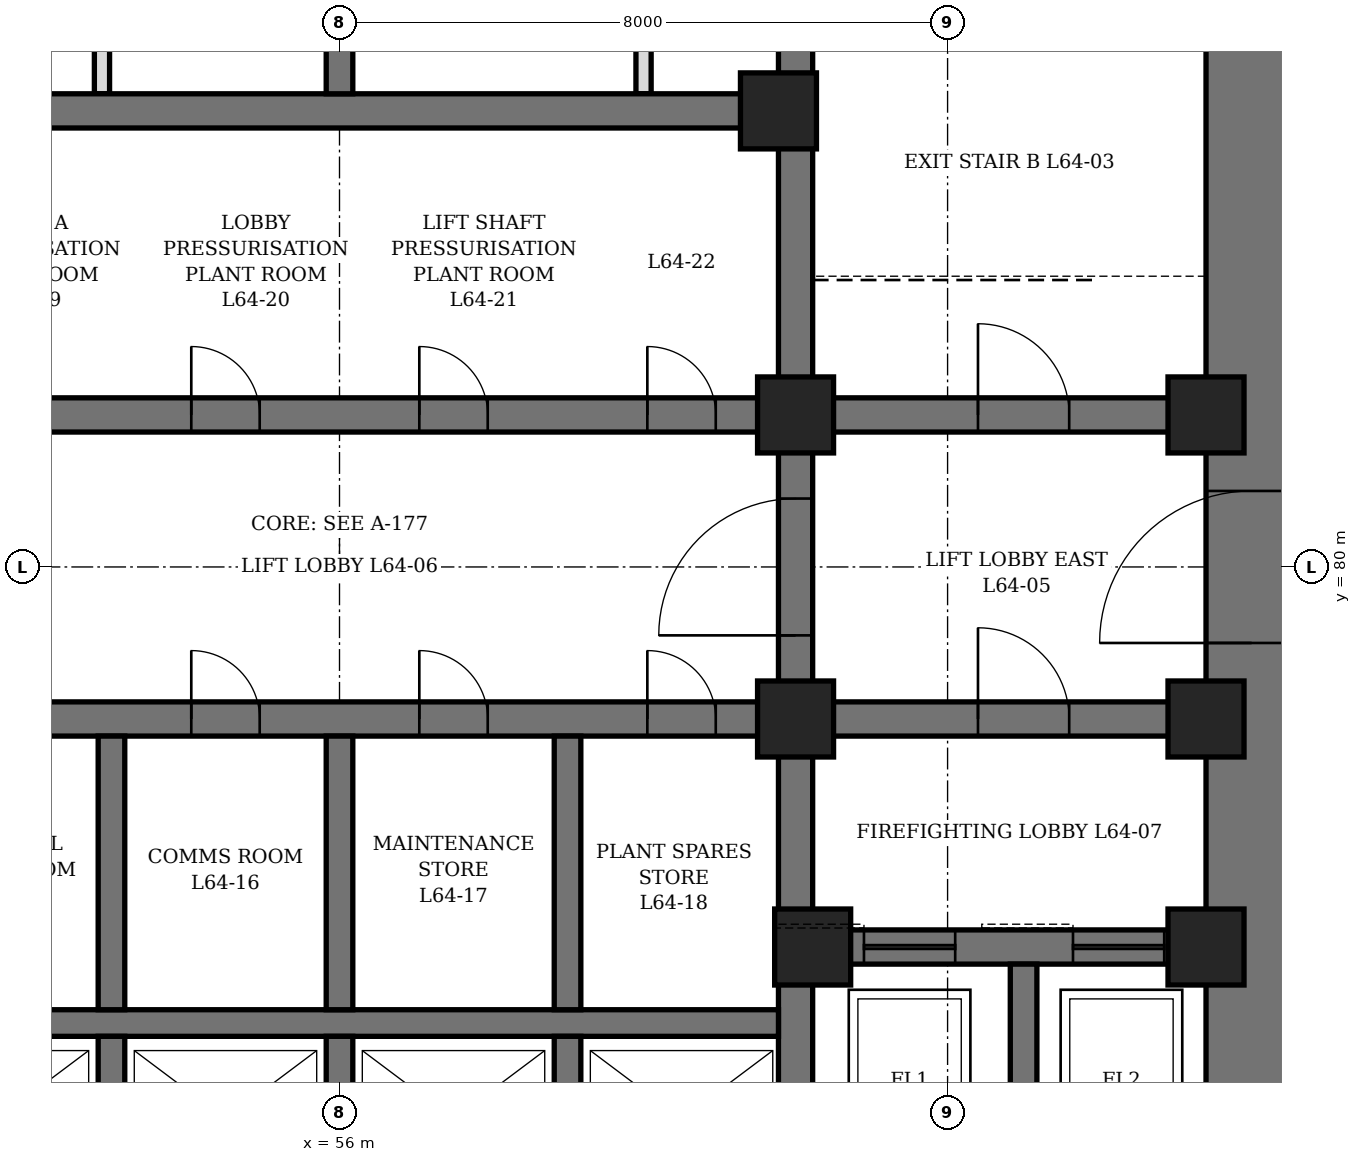
"""IFC4 building model, lengths in metres.
Left out: names, types, materials, properties, quantities, classifications, styles, units other than length and angle.
Written with IfcOpenShell. Run it as: python <this file> out.ifc"""

import sys

from ifc_helpers import new_model, si_unit, direction, frame, frame_2d, origin, origin_2d, place, context, subcontext, project, spatial, polyline, rectangle, hollow_rectangle, outline, extrude, element, fill, save


model = new_model("IFC4")
c1 = context("Model", 3, precision=1e-05, world=origin(), true_north=direction((0.0, 1.0)))
c2 = subcontext(c1, "Body", "Model", "MODEL_VIEW")
j1 = project(units=[si_unit("LENGTHUNIT", "METRE"), si_unit("PLANEANGLEUNIT", "RADIAN")], contexts=[c1])
p1 = place(None, origin())
s1 = spatial("IfcSite", under=j1, at=p1, CompositionType="ELEMENT")
p2 = place(p1, origin())
s2 = spatial("IfcBuilding", under=s1, at=p2, CompositionType="ELEMENT")
p3 = place(p2, frame((0.0, 0.0, 285.7)))
s3 = spatial("IfcBuildingStorey", under=s2, at=p3, CompositionType="ELEMENT", Elevation=285.7)
p4 = place(p3, frame((68.0, 70.4, 0.0), z_axis=(0.0, 0.0, 1.0), x_axis=(0.0, 1.0, 0.0)))
e1 = element("IfcWall", 1, at=p4, inside=s3, PredefinedType="SHEAR", context=c2, shape_type="SweptSolid", body=[
    extrude(outline(polyline([(0.0, 0.0), (19.2, 0.0), (19.2, 16.743), (0.0, 9.537), (0.0, 0.0)])), frame((0.0, 0.6, 0.0), z_axis=(0.0, -1.0, 0.0), x_axis=(1.0, 0.0, 0.0)), (0.0, 0.0, 1.0), 1.2),
])
p5 = place(p4, frame((8.6, 0.0, 0.0)))
e2 = element("IfcOpeningElement", 2, at=p5, cuts=e1, PredefinedType="OPENING", context=c2, shape_type="SweptSolid", body=[
    extrude(rectangle(XDim=2.0, YDim=2.4, at=frame_2d((1.0, 1.2))), frame((0.0, 0.61, 0.0), z_axis=(0.0, -1.0, 0.0), x_axis=(1.0, 0.0, 0.0)), (0.0, 0.0, 1.0), 1.22),
])
p6 = place(p3, frame((62.0, 71.6, 0.0), z_axis=(0.0, 0.0, 1.0), x_axis=(0.0, 1.0, 0.0)))
e3 = element("IfcWall", 3, at=p6, inside=s3, PredefinedType="SHEAR", context=c2, shape_type="SweptSolid", body=[
    extrude(outline(polyline([(0.0, 0.0), (16.8, 0.0), (16.8, 16.293), (0.0, 9.987), (0.0, 0.0)])), frame((0.0, 0.225, 0.0), z_axis=(0.0, -1.0, 0.0), x_axis=(1.0, 0.0, 0.0)), (0.0, 0.0, 1.0), 0.45),
])
p7 = place(p6, frame((7.5, 0.0, 0.0)))
e4 = element("IfcOpeningElement", 4, at=p7, cuts=e3, PredefinedType="OPENING", context=c2, shape_type="SweptSolid", body=[
    extrude(rectangle(XDim=1.8, YDim=2.4, at=frame_2d((0.9, 1.2))), frame((0.0, 0.235, 0.0), z_axis=(0.0, -1.0, 0.0), x_axis=(1.0, 0.0, 0.0)), (0.0, 0.0, 1.0), 0.47),
])
p8 = place(p3, frame((62.225, 75.0, 0.0), z_axis=(0.0, 0.0, 1.0), x_axis=(1.0, 0.0, 0.0)))
e5 = element("IfcWall", 5, at=p8, inside=s3, PredefinedType="SHEAR", context=c2, shape_type="SweptSolid", body=[
    extrude(outline(polyline([(0.0, 0.0), (5.175, 0.0), (5.175, 11.179), (0.0, 11.179), (0.0, 0.0)])), frame((0.0, 0.225, 0.0), z_axis=(0.0, -1.0, 0.0), x_axis=(1.0, 0.0, 0.0)), (0.0, 0.0, 1.0), 0.45),
])
p9 = place(p8, frame((0.675, 0.0, 0.0)))
e6 = element("IfcOpeningElement", 6, at=p9, cuts=e5, PredefinedType="OPENING", context=c2, shape_type="SweptSolid", body=[
    extrude(rectangle(XDim=1.2, YDim=2.2, at=frame_2d((0.6, 1.1))), frame((0.0, 0.235, 0.0), z_axis=(0.0, -1.0, 0.0), x_axis=(1.0, 0.0, 0.0)), (0.0, 0.0, 1.0), 0.47),
])
p10 = place(p8, frame((3.425, 0.0, 0.0)))
e7 = element("IfcOpeningElement", 7, at=p10, cuts=e5, PredefinedType="OPENING", context=c2, shape_type="SweptSolid", body=[
    extrude(rectangle(XDim=1.2, YDim=2.2, at=frame_2d((0.6, 1.1))), frame((0.0, 0.235, 0.0), z_axis=(0.0, -1.0, 0.0), x_axis=(1.0, 0.0, 0.0)), (0.0, 0.0, 1.0), 0.47),
])
p11 = place(p3, frame((62.225, 78.0, 0.0), z_axis=(0.0, 0.0, 1.0), x_axis=(1.0, 0.0, 0.0)))
e8 = element("IfcWall", 8, at=p11, inside=s3, PredefinedType="SHEAR", context=c2, shape_type="SweptSolid", body=[
    extrude(outline(polyline([(0.0, 0.0), (5.175, 0.0), (5.175, 12.305), (0.0, 12.305), (0.0, 0.0)])), frame((0.0, 0.225, 0.0), z_axis=(0.0, -1.0, 0.0), x_axis=(1.0, 0.0, 0.0)), (0.0, 0.0, 1.0), 0.45),
])
p12 = place(p11, frame((2.175, 0.0, 0.0)))
e9 = element("IfcOpeningElement", 9, at=p12, cuts=e8, PredefinedType="OPENING", context=c2, shape_type="SweptSolid", body=[
    extrude(rectangle(XDim=1.2, YDim=2.1, at=frame_2d((0.6, 1.05))), frame((0.0, 0.235, 0.0), z_axis=(0.0, -1.0, 0.0), x_axis=(1.0, 0.0, 0.0)), (0.0, 0.0, 1.0), 0.47),
])
p13 = place(p3, frame((62.225, 82.0, 0.0), z_axis=(0.0, 0.0, 1.0), x_axis=(1.0, 0.0, 0.0)))
e10 = element("IfcWall", 10, at=p13, inside=s3, PredefinedType="SHEAR", context=c2, shape_type="SweptSolid", body=[
    extrude(outline(polyline([(0.0, 0.0), (5.175, 0.0), (5.175, 13.806), (0.0, 13.806), (0.0, 0.0)])), frame((0.0, 0.225, 0.0), z_axis=(0.0, -1.0, 0.0), x_axis=(1.0, 0.0, 0.0)), (0.0, 0.0, 1.0), 0.45),
])
p14 = place(p13, frame((2.175, 0.0, 0.0)))
e11 = element("IfcOpeningElement", 11, at=p14, cuts=e10, PredefinedType="OPENING", context=c2, shape_type="SweptSolid", body=[
    extrude(rectangle(XDim=1.2, YDim=2.1, at=frame_2d((0.6, 1.05))), frame((0.0, 0.235, 0.0), z_axis=(0.0, -1.0, 0.0), x_axis=(1.0, 0.0, 0.0)), (0.0, 0.0, 1.0), 0.47),
])
p15 = place(p3, frame((50.225, 78.0, 0.0), z_axis=(0.0, 0.0, 1.0), x_axis=(1.0, 0.0, 0.0)))
e12 = element("IfcWall", 12, at=p15, inside=s3, PredefinedType="SHEAR", context=c2, shape_type="SweptSolid", body=[
    extrude(outline(polyline([(0.0, 0.0), (11.55, 0.0), (11.55, 12.305), (0.0, 12.305), (0.0, 0.0)])), frame((0.0, 0.225, 0.0), z_axis=(0.0, -1.0, 0.0), x_axis=(1.0, 0.0, 0.0)), (0.0, 0.0, 1.0), 0.45),
])
p16 = place(p15, frame((0.825, 0.0, 0.0)))
e13 = element("IfcOpeningElement", 13, at=p16, cuts=e12, PredefinedType="OPENING", context=c2, shape_type="SweptSolid", body=[
    extrude(rectangle(XDim=0.9, YDim=2.1, at=frame_2d((0.45, 1.05))), frame((0.0, 0.235, 0.0), z_axis=(0.0, -1.0, 0.0), x_axis=(1.0, 0.0, 0.0)), (0.0, 0.0, 1.0), 0.47),
])
p17 = place(p15, frame((3.825, 0.0, 0.0)))
e14 = element("IfcOpeningElement", 14, at=p17, cuts=e12, PredefinedType="OPENING", context=c2, shape_type="SweptSolid", body=[
    extrude(rectangle(XDim=0.9, YDim=2.1, at=frame_2d((0.45, 1.05))), frame((0.0, 0.235, 0.0), z_axis=(0.0, -1.0, 0.0), x_axis=(1.0, 0.0, 0.0)), (0.0, 0.0, 1.0), 0.47),
])
p18 = place(p15, frame((6.825, 0.0, 0.0)))
e15 = element("IfcOpeningElement", 15, at=p18, cuts=e12, PredefinedType="OPENING", context=c2, shape_type="SweptSolid", body=[
    extrude(rectangle(XDim=0.9, YDim=2.1, at=frame_2d((0.45, 1.05))), frame((0.0, 0.235, 0.0), z_axis=(0.0, -1.0, 0.0), x_axis=(1.0, 0.0, 0.0)), (0.0, 0.0, 1.0), 0.47),
])
p19 = place(p15, frame((9.825, 0.0, 0.0)))
e16 = element("IfcOpeningElement", 16, at=p19, cuts=e12, PredefinedType="OPENING", context=c2, shape_type="SweptSolid", body=[
    extrude(rectangle(XDim=0.9, YDim=2.1, at=frame_2d((0.45, 1.05))), frame((0.0, 0.235, 0.0), z_axis=(0.0, -1.0, 0.0), x_axis=(1.0, 0.0, 0.0)), (0.0, 0.0, 1.0), 0.47),
])
p20 = place(p3, frame((50.225, 82.0, 0.0), z_axis=(0.0, 0.0, 1.0), x_axis=(1.0, 0.0, 0.0)))
e17 = element("IfcWall", 17, at=p20, inside=s3, PredefinedType="SHEAR", context=c2, shape_type="SweptSolid", body=[
    extrude(outline(polyline([(0.0, 0.0), (11.55, 0.0), (11.55, 13.806), (0.0, 13.806), (0.0, 0.0)])), frame((0.0, 0.225, 0.0), z_axis=(0.0, -1.0, 0.0), x_axis=(1.0, 0.0, 0.0)), (0.0, 0.0, 1.0), 0.45),
])
p21 = place(p20, frame((0.825, 0.0, 0.0)))
e18 = element("IfcOpeningElement", 18, at=p21, cuts=e17, PredefinedType="OPENING", context=c2, shape_type="SweptSolid", body=[
    extrude(rectangle(XDim=0.9, YDim=2.1, at=frame_2d((0.45, 1.05))), frame((0.0, 0.235, 0.0), z_axis=(0.0, -1.0, 0.0), x_axis=(1.0, 0.0, 0.0)), (0.0, 0.0, 1.0), 0.47),
])
p22 = place(p20, frame((3.825, 0.0, 0.0)))
e19 = element("IfcOpeningElement", 19, at=p22, cuts=e17, PredefinedType="OPENING", context=c2, shape_type="SweptSolid", body=[
    extrude(rectangle(XDim=0.9, YDim=2.1, at=frame_2d((0.45, 1.05))), frame((0.0, 0.235, 0.0), z_axis=(0.0, -1.0, 0.0), x_axis=(1.0, 0.0, 0.0)), (0.0, 0.0, 1.0), 0.47),
])
p23 = place(p20, frame((6.825, 0.0, 0.0)))
e20 = element("IfcOpeningElement", 20, at=p23, cuts=e17, PredefinedType="OPENING", context=c2, shape_type="SweptSolid", body=[
    extrude(rectangle(XDim=0.9, YDim=2.1, at=frame_2d((0.45, 1.05))), frame((0.0, 0.235, 0.0), z_axis=(0.0, -1.0, 0.0), x_axis=(1.0, 0.0, 0.0)), (0.0, 0.0, 1.0), 0.47),
])
p24 = place(p20, frame((9.825, 0.0, 0.0)))
e21 = element("IfcOpeningElement", 21, at=p24, cuts=e17, PredefinedType="OPENING", context=c2, shape_type="SweptSolid", body=[
    extrude(rectangle(XDim=0.9, YDim=2.1, at=frame_2d((0.45, 1.05))), frame((0.0, 0.235, 0.0), z_axis=(0.0, -1.0, 0.0), x_axis=(1.0, 0.0, 0.0)), (0.0, 0.0, 1.0), 0.47),
])
p25 = place(p3, frame((50.225, 86.0, 0.0), z_axis=(0.0, 0.0, 1.0), x_axis=(1.0, 0.0, 0.0)))
e22 = element("IfcWall", 22, at=p25, inside=s3, PredefinedType="SHEAR", context=c2, shape_type="SweptSolid", body=[
    extrude(outline(polyline([(0.0, 0.0), (11.55, 0.0), (11.55, 15.307), (0.0, 15.307), (0.0, 0.0)])), frame((0.0, 0.225, 0.0), z_axis=(0.0, -1.0, 0.0), x_axis=(1.0, 0.0, 0.0)), (0.0, 0.0, 1.0), 0.45),
])
p26 = place(p3, frame((50.225, 74.0, 0.0), z_axis=(0.0, 0.0, 1.0), x_axis=(1.0, 0.0, 0.0)))
e23 = element("IfcWall", 23, at=p26, inside=s3, PredefinedType="SHEAR", context=c2, shape_type="SweptSolid", body=[
    extrude(outline(polyline([(0.0, 0.0), (11.55, 0.0), (11.55, 10.822), (0.0, 10.822), (0.0, 0.0)])), frame((0.0, 0.175, 0.0), z_axis=(0.0, -1.0, 0.0), x_axis=(1.0, 0.0, 0.0)), (0.0, 0.0, 1.0), 0.35),
])
p27 = place(p3, frame((53.0, 71.6, 0.0), z_axis=(0.0, 0.0, 1.0), x_axis=(0.0, 1.0, 0.0)))
e24 = element("IfcWall", 24, at=p27, inside=s3, PredefinedType="SHEAR", context=c2, shape_type="SweptSolid", body=[
    extrude(outline(polyline([(0.0, 0.0), (2.225, 0.0), (2.225, 10.822), (0.0, 9.987), (0.0, 0.0)])), frame((0.0, 0.175, 0.0), z_axis=(0.0, -1.0, 0.0), x_axis=(1.0, 0.0, 0.0)), (0.0, 0.0, 1.0), 0.35),
])
p28 = place(p3, frame((53.0, 74.175, 0.0), z_axis=(0.0, 0.0, 1.0), x_axis=(0.0, 1.0, 0.0)))
e25 = element("IfcWall", 25, at=p28, inside=s3, PredefinedType="SHEAR", context=c2, shape_type="SweptSolid", body=[
    extrude(outline(polyline([(0.0, 0.0), (3.6, 0.0), (3.6, 12.305), (0.0, 10.954), (0.0, 0.0)])), frame((0.0, 0.175, 0.0), z_axis=(0.0, -1.0, 0.0), x_axis=(1.0, 0.0, 0.0)), (0.0, 0.0, 1.0), 0.35),
])
p29 = place(p3, frame((56.0, 71.6, 0.0), z_axis=(0.0, 0.0, 1.0), x_axis=(0.0, 1.0, 0.0)))
e26 = element("IfcWall", 26, at=p29, inside=s3, PredefinedType="SHEAR", context=c2, shape_type="SweptSolid", body=[
    extrude(outline(polyline([(0.0, 0.0), (2.225, 0.0), (2.225, 10.822), (0.0, 9.987), (0.0, 0.0)])), frame((0.0, 0.175, 0.0), z_axis=(0.0, -1.0, 0.0), x_axis=(1.0, 0.0, 0.0)), (0.0, 0.0, 1.0), 0.35),
])
p30 = place(p3, frame((56.0, 74.175, 0.0), z_axis=(0.0, 0.0, 1.0), x_axis=(0.0, 1.0, 0.0)))
e27 = element("IfcWall", 27, at=p30, inside=s3, PredefinedType="SHEAR", context=c2, shape_type="SweptSolid", body=[
    extrude(outline(polyline([(0.0, 0.0), (3.6, 0.0), (3.6, 12.305), (0.0, 10.954), (0.0, 0.0)])), frame((0.0, 0.175, 0.0), z_axis=(0.0, -1.0, 0.0), x_axis=(1.0, 0.0, 0.0)), (0.0, 0.0, 1.0), 0.35),
])
p31 = place(p3, frame((59.0, 71.6, 0.0), z_axis=(0.0, 0.0, 1.0), x_axis=(0.0, 1.0, 0.0)))
e28 = element("IfcWall", 28, at=p31, inside=s3, PredefinedType="SHEAR", context=c2, shape_type="SweptSolid", body=[
    extrude(outline(polyline([(0.0, 0.0), (2.225, 0.0), (2.225, 10.822), (0.0, 9.987), (0.0, 0.0)])), frame((0.0, 0.175, 0.0), z_axis=(0.0, -1.0, 0.0), x_axis=(1.0, 0.0, 0.0)), (0.0, 0.0, 1.0), 0.35),
])
p32 = place(p3, frame((59.0, 74.175, 0.0), z_axis=(0.0, 0.0, 1.0), x_axis=(0.0, 1.0, 0.0)))
e29 = element("IfcWall", 29, at=p32, inside=s3, PredefinedType="SHEAR", context=c2, shape_type="SweptSolid", body=[
    extrude(outline(polyline([(0.0, 0.0), (3.6, 0.0), (3.6, 12.305), (0.0, 10.954), (0.0, 0.0)])), frame((0.0, 0.175, 0.0), z_axis=(0.0, -1.0, 0.0), x_axis=(1.0, 0.0, 0.0)), (0.0, 0.0, 1.0), 0.35),
])
p33 = place(p3, frame((65.0, 71.6, 0.0), z_axis=(0.0, 0.0, 1.0), x_axis=(0.0, 1.0, 0.0)))
e30 = element("IfcWall", 30, at=p33, inside=s3, PredefinedType="SHEAR", context=c2, shape_type="SweptSolid", body=[
    extrude(outline(polyline([(0.0, 0.0), (3.175, 0.0), (3.175, 11.179), (0.0, 9.987), (0.0, 0.0)])), frame((0.0, 0.175, 0.0), z_axis=(0.0, -1.0, 0.0), x_axis=(1.0, 0.0, 0.0)), (0.0, 0.0, 1.0), 0.35),
])
p34 = place(p3, frame((56.0, 86.225, 0.0), z_axis=(0.0, 0.0, 1.0), x_axis=(0.0, 1.0, 0.0)))
e31 = element("IfcWall", 31, at=p34, inside=s3, PredefinedType="SHEAR", context=c2, shape_type="SweptSolid", body=[
    extrude(outline(polyline([(0.0, 0.0), (2.175, 0.0), (2.175, 16.293), (0.0, 15.476), (0.0, 0.0)])), frame((0.0, 0.175, 0.0), z_axis=(0.0, -1.0, 0.0), x_axis=(1.0, 0.0, 0.0)), (0.0, 0.0, 1.0), 0.35),
])
p35 = place(p3, frame((61.775, 86.0, 0.0), z_axis=(0.0, 0.0, 1.0), x_axis=(1.0, 0.0, 0.0)))
e32 = element("IfcColumn", 32, at=p35, inside=s3, PredefinedType="COLUMN", context=c2, shape_type="SweptSolid", body=[
    extrude(hollow_rectangle(XDim=1.0, YDim=1.0, WallThickness=0.15, at=origin_2d()), origin(), (0.0, 0.0, 1.0), 15.204),
])
p36 = place(p3, frame((62.0, 78.0, 0.0), z_axis=(0.0, 0.0, 1.0), x_axis=(1.0, 0.0, 0.0)))
e33 = element("IfcColumn", 33, at=p36, inside=s3, PredefinedType="COLUMN", context=c2, shape_type="SweptSolid", body=[
    extrude(hollow_rectangle(XDim=1.0, YDim=1.0, WallThickness=0.15, at=origin_2d()), origin(), (0.0, 0.0, 1.0), 12.201),
])
p37 = place(p3, frame((62.0, 82.0, 0.0), z_axis=(0.0, 0.0, 1.0), x_axis=(1.0, 0.0, 0.0)))
e34 = element("IfcColumn", 34, at=p37, inside=s3, PredefinedType="COLUMN", context=c2, shape_type="SweptSolid", body=[
    extrude(hollow_rectangle(XDim=1.0, YDim=1.0, WallThickness=0.15, at=origin_2d()), origin(), (0.0, 0.0, 1.0), 13.703),
])
for number, where, z_axis, x_axis in (
    (35, (62.225, 75.0, 0.0), (0.0, 0.0, 1.0), (1.0, 0.0, 0.0)),
    (36, (67.4, 75.0, 0.0), (0.0, 0.0, 1.0), (1.0, 0.0, 0.0)),
):
    element("IfcColumn", number, at=place(p3, frame(where, z_axis=z_axis, x_axis=x_axis)), inside=s3, PredefinedType="COLUMN", context=c2, shape_type="SweptSolid", body=[
        extrude(hollow_rectangle(XDim=1.0, YDim=1.0, WallThickness=0.15, at=origin_2d()), origin(), (0.0, 0.0, 1.0), 11.075),
    ])
p38 = place(p3, frame((67.4, 78.0, 0.0), z_axis=(0.0, 0.0, 1.0), x_axis=(1.0, 0.0, 0.0)))
e37 = element("IfcColumn", 37, at=p38, inside=s3, PredefinedType="COLUMN", context=c2, shape_type="SweptSolid", body=[
    extrude(hollow_rectangle(XDim=1.0, YDim=1.0, WallThickness=0.15, at=origin_2d()), origin(), (0.0, 0.0, 1.0), 12.201),
])
p39 = place(p3, frame((67.4, 82.0, 0.0), z_axis=(0.0, 0.0, 1.0), x_axis=(1.0, 0.0, 0.0)))
e38 = element("IfcColumn", 38, at=p39, inside=s3, PredefinedType="COLUMN", context=c2, shape_type="SweptSolid", body=[
    extrude(hollow_rectangle(XDim=1.0, YDim=1.0, WallThickness=0.15, at=origin_2d()), origin(), (0.0, 0.0, 1.0), 13.703),
])
p40 = place(p3, frame((52.875, 86.225, 0.0), z_axis=(0.0, 0.0, 1.0), x_axis=(0.0, 1.0, 0.0)))
e39 = element("IfcWall", 39, at=p40, inside=s3, PredefinedType="PARTITIONING", context=c2, shape_type="SweptSolid", body=[
    extrude(rectangle(XDim=2.175, YDim=0.2, at=frame_2d((1.087, 0.0))), origin(), (0.0, 0.0, 1.0), 8.0),
])
p41 = place(p3, frame((60.0, 86.225, 0.0), z_axis=(0.0, 0.0, 1.0), x_axis=(0.0, 1.0, 0.0)))
e40 = element("IfcWall", 40, at=p41, inside=s3, PredefinedType="PARTITIONING", context=c2, shape_type="SweptSolid", body=[
    extrude(rectangle(XDim=2.175, YDim=0.2, at=frame_2d((1.087, 0.0))), origin(), (0.0, 0.0, 1.0), 8.0),
])
p42 = place(p41, frame((0.637, 0.0, 0.0)))
e41 = element("IfcOpeningElement", 41, at=p42, cuts=e40, PredefinedType="OPENING", context=c2, shape_type="SweptSolid", body=[
    extrude(rectangle(XDim=0.9, YDim=2.1, at=frame_2d((0.45, 1.05))), frame((0.0, 0.11, 0.0), z_axis=(0.0, -1.0, 0.0), x_axis=(1.0, 0.0, 0.0)), (0.0, 0.0, 1.0), 0.22),
])
p43 = place(p17, origin())
e42 = element("IfcDoor", 42, at=p43, inside=s3, OperationType="SINGLE_SWING_LEFT", PredefinedType="DOOR", context=c2, shape_type="SweptSolid", body=[
    extrude(rectangle(XDim=0.9, YDim=2.1, at=frame_2d((0.45, 1.05))), frame((0.0, 0.225, 0.0), z_axis=(0.0, -1.0, 0.0), x_axis=(1.0, 0.0, 0.0)), (0.0, 0.0, 1.0), 0.449),
])
fill(e14, e42)
p44 = place(p18, origin())
e43 = element("IfcDoor", 43, at=p44, inside=s3, OperationType="SINGLE_SWING_LEFT", PredefinedType="DOOR", context=c2, shape_type="SweptSolid", body=[
    extrude(rectangle(XDim=0.9, YDim=2.1, at=frame_2d((0.45, 1.05))), frame((0.0, 0.225, 0.0), z_axis=(0.0, -1.0, 0.0), x_axis=(1.0, 0.0, 0.0)), (0.0, 0.0, 1.0), 0.449),
])
fill(e15, e43)
p45 = place(p19, origin())
e44 = element("IfcDoor", 44, at=p45, inside=s3, OperationType="SINGLE_SWING_LEFT", PredefinedType="DOOR", context=c2, shape_type="SweptSolid", body=[
    extrude(rectangle(XDim=0.9, YDim=2.1, at=frame_2d((0.45, 1.05))), frame((0.0, 0.225, 0.0), z_axis=(0.0, -1.0, 0.0), x_axis=(1.0, 0.0, 0.0)), (0.0, 0.0, 1.0), 0.449),
])
fill(e16, e44)
p46 = place(p22, origin())
e45 = element("IfcDoor", 45, at=p46, inside=s3, OperationType="SINGLE_SWING_LEFT", PredefinedType="DOOR", context=c2, shape_type="SweptSolid", body=[
    extrude(rectangle(XDim=0.9, YDim=2.1, at=frame_2d((0.45, 1.05))), frame((0.0, 0.225, 0.0), z_axis=(0.0, -1.0, 0.0), x_axis=(1.0, 0.0, 0.0)), (0.0, 0.0, 1.0), 0.449),
])
fill(e19, e45)
p47 = place(p23, origin())
e46 = element("IfcDoor", 46, at=p47, inside=s3, OperationType="SINGLE_SWING_LEFT", PredefinedType="DOOR", context=c2, shape_type="SweptSolid", body=[
    extrude(rectangle(XDim=0.9, YDim=2.1, at=frame_2d((0.45, 1.05))), frame((0.0, 0.225, 0.0), z_axis=(0.0, -1.0, 0.0), x_axis=(1.0, 0.0, 0.0)), (0.0, 0.0, 1.0), 0.449),
])
fill(e20, e46)
p48 = place(p24, origin())
e47 = element("IfcDoor", 47, at=p48, inside=s3, OperationType="SINGLE_SWING_LEFT", PredefinedType="DOOR", context=c2, shape_type="SweptSolid", body=[
    extrude(rectangle(XDim=0.9, YDim=2.1, at=frame_2d((0.45, 1.05))), frame((0.0, 0.225, 0.0), z_axis=(0.0, -1.0, 0.0), x_axis=(1.0, 0.0, 0.0)), (0.0, 0.0, 1.0), 0.449),
])
fill(e21, e47)
p49 = place(p14, origin())
e48 = element("IfcDoor", 48, at=p49, inside=s3, OperationType="SINGLE_SWING_LEFT", PredefinedType="DOOR", context=c2, shape_type="SweptSolid", body=[
    extrude(rectangle(XDim=1.2, YDim=2.1, at=frame_2d((0.6, 1.05))), frame((0.0, 0.225, 0.0), z_axis=(0.0, -1.0, 0.0), x_axis=(1.0, 0.0, 0.0)), (0.0, 0.0, 1.0), 0.449),
])
fill(e11, e48)
p50 = place(p5, origin())
e49 = element("IfcDoor", 49, at=p50, inside=s3, OperationType="DOUBLE_DOOR_SINGLE_SWING", PredefinedType="DOOR", context=c2, shape_type="SweptSolid", body=[
    extrude(rectangle(XDim=2.0, YDim=2.4, at=frame_2d((1.0, 1.2))), frame((0.0, 0.35, 0.0), z_axis=(0.0, -1.0, 0.0), x_axis=(1.0, 0.0, 0.0)), (0.0, 0.0, 1.0), 0.7),
])
fill(e2, e49)
p51 = place(p7, origin())
e50 = element("IfcDoor", 50, at=p51, inside=s3, OperationType="DOUBLE_DOOR_SINGLE_SWING", PredefinedType="DOOR", context=c2, shape_type="SweptSolid", body=[
    extrude(rectangle(XDim=1.8, YDim=2.4, at=frame_2d((0.9, 1.2))), frame((0.0, 0.225, 0.0), z_axis=(0.0, -1.0, 0.0), x_axis=(1.0, 0.0, 0.0)), (0.0, 0.0, 1.0), 0.449),
])
fill(e4, e50)
p52 = place(p12, origin())
e51 = element("IfcDoor", 51, at=p52, inside=s3, OperationType="SINGLE_SWING_RIGHT", PredefinedType="DOOR", context=c2, shape_type="SweptSolid", body=[
    extrude(rectangle(XDim=1.2, YDim=2.1, at=frame_2d((0.6, 1.05))), frame((0.0, 0.225, 0.0), z_axis=(0.0, -1.0, 0.0), x_axis=(1.0, 0.0, 0.0)), (0.0, 0.0, 1.0), 0.449),
])
fill(e9, e51)
p53 = place(p9, origin())
e52 = element("IfcDoor", 52, at=p53, inside=s3, OperationType="SLIDING_TO_LEFT", PredefinedType="DOOR", context=c2, shape_type="SweptSolid", body=[
    extrude(rectangle(XDim=1.2, YDim=2.2, at=frame_2d((0.6, 1.1))), frame((0.0, 0.225, 0.0), z_axis=(0.0, -1.0, 0.0), x_axis=(1.0, 0.0, 0.0)), (0.0, 0.0, 1.0), 0.449),
])
fill(e6, e52)
p54 = place(p10, origin())
e53 = element("IfcDoor", 53, at=p54, inside=s3, OperationType="SLIDING_TO_LEFT", PredefinedType="DOOR", context=c2, shape_type="SweptSolid", body=[
    extrude(rectangle(XDim=1.2, YDim=2.2, at=frame_2d((0.6, 1.1))), frame((0.0, 0.225, 0.0), z_axis=(0.0, -1.0, 0.0), x_axis=(1.0, 0.0, 0.0)), (0.0, 0.0, 1.0), 0.449),
])
fill(e7, e53)
save(model, sys.argv[1])
